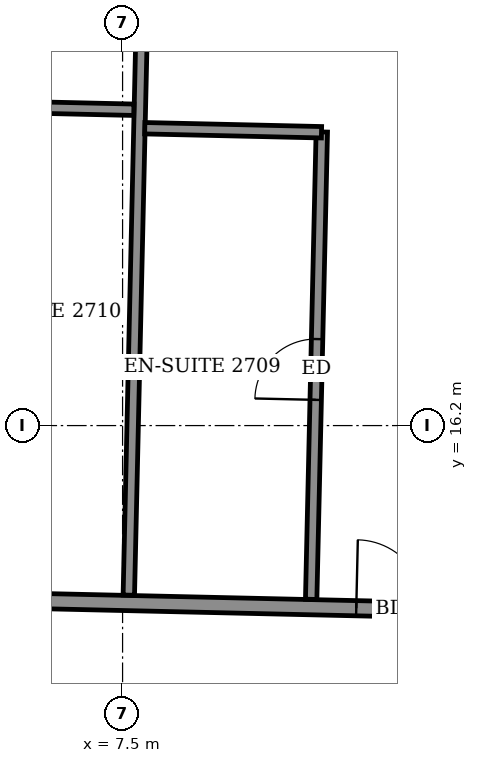
"""IFC4 building model, lengths in metres.
Left out: names, types, materials, properties, quantities, classifications, styles, units other than length and angle.
Written with IfcOpenShell. Run it as: python <this file> out.ifc"""

import sys

from ifc_helpers import new_model, si_unit, direction, frame, frame_2d, origin, place, context, subcontext, project, spatial, rectangle, extrude, element, fill, save


model = new_model("IFC4")
c1 = context("Model", 3, precision=1e-05, world=origin(), true_north=direction((0.0, 1.0)))
c2 = subcontext(c1, "Body", "Model", "MODEL_VIEW")
j1 = project(units=[si_unit("LENGTHUNIT", "METRE"), si_unit("PLANEANGLEUNIT", "RADIAN")], contexts=[c1])
p1 = place(None, origin())
s1 = spatial("IfcSite", under=j1, at=p1, CompositionType="ELEMENT")
p2 = place(p1, origin())
s2 = spatial("IfcBuilding", under=s1, at=p2, CompositionType="ELEMENT")
p3 = place(p2, frame((0.0, 0.0, 109.1)))
s3 = spatial("IfcBuildingStorey", under=s2, at=p3, CompositionType="ELEMENT", Elevation=109.1)
p4 = place(p3, frame((-26.316, 14.634, 0.0), z_axis=(0.0, 0.0, 1.0), x_axis=(0.999742734556, -0.02268181435, 0.0)))
e1 = element("IfcWall", 1, at=p4, inside=s3, PredefinedType="PARTITIONING", context=c2, shape_type="SweptSolid", body=[
    extrude(rectangle(XDim=50.708, YDim=0.2, at=frame_2d((25.354, 0.0))), origin(), (0.0, 0.0, 1.0), 3.05),
])
p5 = place(p4, frame((48.229, 0.0, 0.0)))
e2 = element("IfcOpeningElement", 2, at=p5, cuts=e1, PredefinedType="OPENING", context=c2, shape_type="SweptSolid", body=[
    extrude(rectangle(XDim=1.0, YDim=2.1, at=frame_2d((0.5, 1.05))), frame((0.0, 0.11, 0.0), z_axis=(0.0, -1.0, 0.0), x_axis=(1.0, 0.0, 0.0)), (0.0, 0.0, 1.0), 0.22),
])
p6 = place(p4, frame((43.6, 0.0, 0.0)))
e3 = element("IfcOpeningElement", 3, at=p6, cuts=e1, PredefinedType="OPENING", context=c2, shape_type="SweptSolid", body=[
    extrude(rectangle(XDim=0.9, YDim=2.1, at=frame_2d((0.45, 1.05))), frame((0.0, 0.11, 0.0), z_axis=(0.0, -1.0, 0.0), x_axis=(1.0, 0.0, 0.0)), (0.0, 0.0, 1.0), 0.22),
])
p7 = place(p4, frame((38.925, 0.0, 0.0)))
e4 = element("IfcOpeningElement", 4, at=p7, cuts=e1, PredefinedType="OPENING", context=c2, shape_type="SweptSolid", body=[
    extrude(rectangle(XDim=0.9, YDim=2.1, at=frame_2d((0.45, 1.05))), frame((0.0, 0.11, 0.0), z_axis=(0.0, -1.0, 0.0), x_axis=(1.0, 0.0, 0.0)), (0.0, 0.0, 1.0), 0.22),
])
p8 = place(p4, frame((36.9, 0.0, 0.0)))
e5 = element("IfcOpeningElement", 5, at=p8, cuts=e1, PredefinedType="OPENING", context=c2, shape_type="SweptSolid", body=[
    extrude(rectangle(XDim=0.9, YDim=2.1, at=frame_2d((0.45, 1.05))), frame((0.0, 0.11, 0.0), z_axis=(0.0, -1.0, 0.0), x_axis=(1.0, 0.0, 0.0)), (0.0, 0.0, 1.0), 0.22),
])
p9 = place(p4, frame((29.975, 0.0, 0.0)))
e6 = element("IfcOpeningElement", 6, at=p9, cuts=e1, PredefinedType="OPENING", context=c2, shape_type="SweptSolid", body=[
    extrude(rectangle(XDim=0.9, YDim=2.1, at=frame_2d((0.45, 1.05))), frame((0.0, 0.11, 0.0), z_axis=(0.0, -1.0, 0.0), x_axis=(1.0, 0.0, 0.0)), (0.0, 0.0, 1.0), 0.22),
])
p10 = place(p4, frame((27.9, 0.0, 0.0)))
e7 = element("IfcOpeningElement", 7, at=p10, cuts=e1, PredefinedType="OPENING", context=c2, shape_type="SweptSolid", body=[
    extrude(rectangle(XDim=0.9, YDim=2.1, at=frame_2d((0.45, 1.05))), frame((0.0, 0.11, 0.0), z_axis=(0.0, -1.0, 0.0), x_axis=(1.0, 0.0, 0.0)), (0.0, 0.0, 1.0), 0.22),
])
p11 = place(p4, frame((21.175, 0.0, 0.0)))
e8 = element("IfcOpeningElement", 8, at=p11, cuts=e1, PredefinedType="OPENING", context=c2, shape_type="SweptSolid", body=[
    extrude(rectangle(XDim=0.9, YDim=2.1, at=frame_2d((0.45, 1.05))), frame((0.0, 0.11, 0.0), z_axis=(0.0, -1.0, 0.0), x_axis=(1.0, 0.0, 0.0)), (0.0, 0.0, 1.0), 0.22),
])
p12 = place(p4, frame((19.25, 0.0, 0.0)))
e9 = element("IfcOpeningElement", 9, at=p12, cuts=e1, PredefinedType="OPENING", context=c2, shape_type="SweptSolid", body=[
    extrude(rectangle(XDim=0.9, YDim=2.1, at=frame_2d((0.45, 1.05))), frame((0.0, 0.11, 0.0), z_axis=(0.0, -1.0, 0.0), x_axis=(1.0, 0.0, 0.0)), (0.0, 0.0, 1.0), 0.22),
])
p13 = place(p4, frame((12.375, 0.0, 0.0)))
e10 = element("IfcOpeningElement", 10, at=p13, cuts=e1, PredefinedType="OPENING", context=c2, shape_type="SweptSolid", body=[
    extrude(rectangle(XDim=0.9, YDim=2.1, at=frame_2d((0.45, 1.05))), frame((0.0, 0.11, 0.0), z_axis=(0.0, -1.0, 0.0), x_axis=(1.0, 0.0, 0.0)), (0.0, 0.0, 1.0), 0.22),
])
p14 = place(p4, frame((10.225, 0.0, 0.0)))
e11 = element("IfcOpeningElement", 11, at=p14, cuts=e1, PredefinedType="OPENING", context=c2, shape_type="SweptSolid", body=[
    extrude(rectangle(XDim=0.9, YDim=2.1, at=frame_2d((0.45, 1.05))), frame((0.0, 0.11, 0.0), z_axis=(0.0, -1.0, 0.0), x_axis=(1.0, 0.0, 0.0)), (0.0, 0.0, 1.0), 0.22),
])
p15 = place(p4, frame((0.85, 0.0, 0.0)))
e12 = element("IfcOpeningElement", 12, at=p15, cuts=e1, PredefinedType="OPENING", context=c2, shape_type="SweptSolid", body=[
    extrude(rectangle(XDim=1.0, YDim=2.1, at=frame_2d((0.5, 1.05))), frame((0.0, 0.11, 0.0), z_axis=(0.0, -1.0, 0.0), x_axis=(1.0, 0.0, 0.0)), (0.0, 0.0, 1.0), 0.22),
])
p16 = place(p4, frame((5.55, 0.0, 0.0)))
e13 = element("IfcOpeningElement", 13, at=p16, cuts=e1, PredefinedType="OPENING", context=c2, shape_type="SweptSolid", body=[
    extrude(rectangle(XDim=0.9, YDim=2.1, at=frame_2d((0.45, 1.05))), frame((0.0, 0.11, 0.0), z_axis=(0.0, -1.0, 0.0), x_axis=(1.0, 0.0, 0.0)), (0.0, 0.0, 1.0), 0.22),
])
p17 = place(p3, frame((7.582, 13.969, 0.0), z_axis=(0.0, 0.0, 1.0), x_axis=(0.022686732602, 0.99974262296, 0.0)))
e14 = element("IfcWall", 14, at=p17, inside=s3, PredefinedType="PARTITIONING", context=c2, shape_type="SweptSolid", body=[
    extrude(rectangle(XDim=11.676, YDim=0.15, at=frame_2d((5.838, 0.0))), origin(), (0.0, 0.0, 1.0), 2.55),
])
p18 = place(p3, frame((9.981, 13.914, 0.0), z_axis=(0.0, 0.0, 1.0), x_axis=(0.022784522714, 0.999740399066, 0.0)))
e15 = element("IfcWall", 15, at=p18, inside=s3, PredefinedType="PARTITIONING", context=c2, shape_type="SweptSolid", body=[
    extrude(rectangle(XDim=6.151, YDim=0.15, at=frame_2d((3.075, 0.0))), origin(), (0.0, 0.0, 1.0), 3.05),
])
p19 = place(p18, frame((2.625, 0.0, 0.0)))
e16 = element("IfcOpeningElement", 16, at=p19, cuts=e15, PredefinedType="OPENING", context=c2, shape_type="SweptSolid", body=[
    extrude(rectangle(XDim=0.8, YDim=2.1, at=frame_2d((0.4, 1.05))), frame((0.0, 0.085, 0.0), z_axis=(0.0, -1.0, 0.0), x_axis=(1.0, 0.0, 0.0)), (0.0, 0.0, 1.0), 0.17),
])
for number, where, z_axis, x_axis in (
    (17, (7.792, 20.112, 0.0), (0.0, 0.0, 1.0), (1.0, -0.023, 0.0)),
    (18, (5.323, 20.408, 0.0), (0.0, 0.0, 1.0), (1.0, -0.023, 0.0)),
):
    element("IfcWall", number, at=place(p3, frame(where, z_axis=z_axis, x_axis=x_axis)), inside=s3, PredefinedType="PARTITIONING", context=c2, shape_type="SweptSolid", body=[
        extrude(rectangle(XDim=2.325, YDim=0.15, at=frame_2d((1.163, 0.0))), origin(), (0.0, 0.0, 1.0), 3.05),
    ])
p20 = place(p8, origin())
e19 = element("IfcDoor", 19, at=p20, inside=s3, OperationType="SINGLE_SWING_LEFT", PredefinedType="DOOR", context=c2, shape_type="SweptSolid", body=[
    extrude(rectangle(XDim=0.9, YDim=2.1, at=frame_2d((0.45, 1.05))), frame((0.0, 0.025, 0.0), z_axis=(0.0, -1.0, 0.0), x_axis=(1.0, 0.0, 0.0)), (0.0, 0.0, 1.0), 0.05),
])
fill(e5, e19)
p21 = place(p19, origin())
e20 = element("IfcDoor", 20, at=p21, inside=s3, OperationType="SINGLE_SWING_LEFT", PredefinedType="DOOR", context=c2, shape_type="SweptSolid", body=[
    extrude(rectangle(XDim=0.8, YDim=2.1, at=frame_2d((0.4, 1.05))), frame((0.0, 0.025, 0.0), z_axis=(0.0, -1.0, 0.0), x_axis=(1.0, 0.0, 0.0)), (0.0, 0.0, 1.0), 0.05),
])
fill(e16, e20)
save(model, sys.argv[1])
